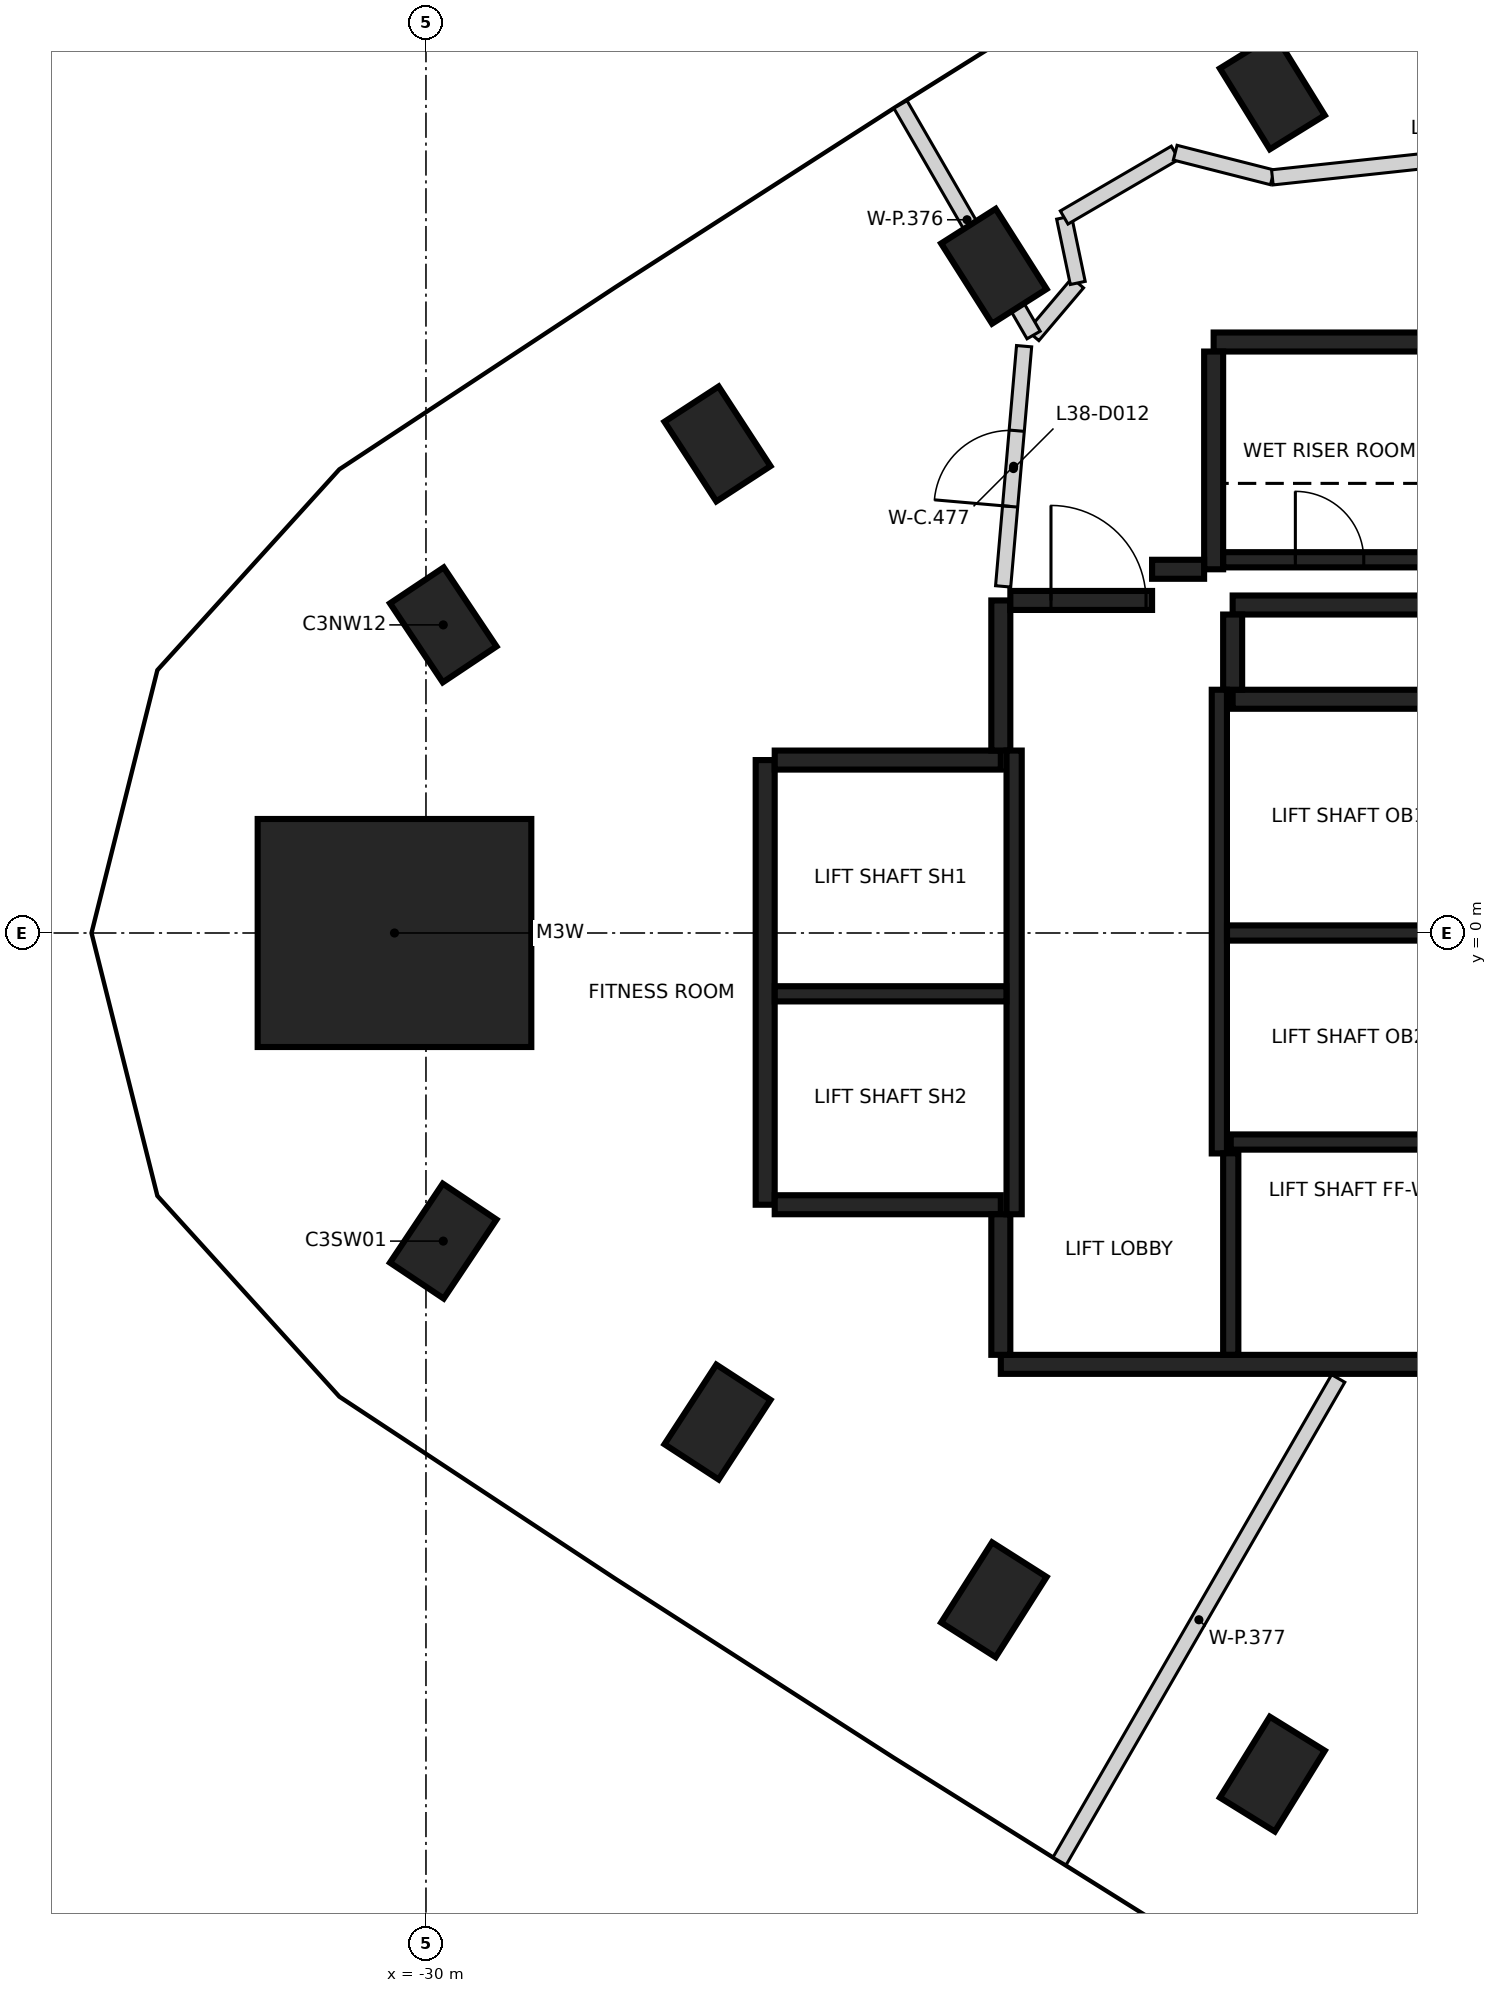
"""IFC4 building model, lengths in metres.
Left out: names, types, materials, properties, quantities, classifications, styles, units other than length and angle.
Written with IfcOpenShell. Run it as: python <this file> out.ifc"""

import sys

from ifc_helpers import new_model, si_unit, direction, frame, frame_2d, origin, origin_2d, place, context, subcontext, project, spatial, rectangle, extrude, element, fill, save


model = new_model("IFC4")
c1 = context("Model", 3, precision=1e-05, world=origin(), true_north=direction((0.0, 1.0)))
c2 = subcontext(c1, "Body", "Model", "MODEL_VIEW")
j1 = project(units=[si_unit("LENGTHUNIT", "METRE"), si_unit("PLANEANGLEUNIT", "RADIAN")], contexts=[c1])
p1 = place(None, origin())
s1 = spatial("IfcSite", under=j1, at=p1, CompositionType="ELEMENT")
p2 = place(p1, origin())
s2 = spatial("IfcBuilding", under=s1, at=p2, CompositionType="ELEMENT")
p3 = place(p2, frame((0.0, 0.0, 154.0)))
s3 = spatial("IfcBuildingStorey", under=s2, at=p3, CompositionType="ELEMENT", Elevation=154.0)
for number, where, z_axis, x_axis in (
    (1, (-18.865, 11.066, -0.4), (0.0, 0.0, 1.0), (-0.526, 0.851, 0.0)),
    (2, (-22.529, 8.772, -0.4), (0.0, 0.0, 1.0), (-0.536, 0.844, 0.0)),
    (3, (-26.165, 6.434, -0.4), (0.0, 0.0, 1.0), (-0.546, 0.838, 0.0)),
    (4, (-29.773, 4.053, -0.4), (0.0, 0.0, 1.0), (-0.556, 0.831, 0.0)),
    (5, (-29.773, -4.053, -0.4), (0.0, 0.0, 1.0), (0.556, 0.831, 0.0)),
    (6, (-26.165, -6.434, -0.4), (0.0, 0.0, 1.0), (0.546, 0.838, 0.0)),
    (7, (-22.529, -8.772, -0.4), (0.0, 0.0, 1.0), (0.536, 0.844, 0.0)),
    (8, (-18.865, -11.066, -0.4), (0.0, 0.0, 1.0), (0.526, 0.851, 0.0)),
):
    element("IfcColumn", number, at=place(p3, frame(where, z_axis=z_axis, x_axis=x_axis)), inside=s3, PredefinedType="COLUMN", context=c2, shape_type="SweptSolid", body=[
        extrude(rectangle(XDim=1.25, YDim=0.85, at=origin_2d()), origin(), (0.0, 0.0, 1.0), 3.6),
    ])
p4 = place(p3, frame((-30.414, 0.0, -0.4), z_axis=(0.0, 0.0, 1.0), x_axis=(1.0, 0.0, 0.0)))
e9 = element("IfcColumn", 9, at=p4, inside=s3, PredefinedType="COLUMN", context=c2, shape_type="SweptSolid", body=[
    extrude(rectangle(XDim=3.6, YDim=3.0, at=origin_2d()), origin(), (0.0, 0.0, 1.0), 3.6),
])
p5 = place(p3, frame((-16.187, -5.675, 0.0), z_axis=(0.0, 0.0, 1.0), x_axis=(-1.0, 0.0, 0.0)))
e10 = element("IfcWall", 10, at=p5, inside=s3, PredefinedType="SHEAR", context=c2, shape_type="SweptSolid", body=[
    extrude(rectangle(XDim=6.25, YDim=0.25, at=frame_2d((3.125, 0.0))), origin(), (0.0, 0.0, 1.0), 3.2),
])
p6 = place(p3, frame((-25.537, -3.575, 0.0), z_axis=(0.0, 0.0, 1.0), x_axis=(0.0, 1.0, 0.0)))
e11 = element("IfcWall", 11, at=p6, inside=s3, PredefinedType="SHEAR", context=c2, shape_type="SweptSolid", body=[
    extrude(rectangle(XDim=5.85, YDim=0.25, at=frame_2d((2.925, 0.0))), origin(), (0.0, 0.0, 1.0), 3.2),
])
p7 = place(p3, frame((-19.387, 3.075, 0.0), z_axis=(0.0, 0.0, 1.0), x_axis=(1.0, 0.0, 0.0)))
e12 = element("IfcWall", 12, at=p7, inside=s3, PredefinedType="SHEAR", context=c2, shape_type="SweptSolid", body=[
    extrude(rectangle(XDim=3.2, YDim=0.25, at=frame_2d((1.6, 0.0))), origin(), (0.0, 0.0, 1.0), 3.2),
])
for number, where, z_axis, x_axis in (
    (13, (-22.437, -3.575, 0.0), (0.0, 0.0, 1.0), (-1.0, 0.0, 0.0)),
    (14, (-25.412, 2.275, 0.0), (0.0, 0.0, 1.0), (1.0, 0.0, 0.0)),
):
    element("IfcWall", number, at=place(p3, frame(where, z_axis=z_axis, x_axis=x_axis)), inside=s3, PredefinedType="SHEAR", context=c2, shape_type="SweptSolid", body=[
        extrude(rectangle(XDim=2.975, YDim=0.25, at=frame_2d((1.487, 0.0))), origin(), (0.0, 0.0, 1.0), 3.2),
    ])
p8 = place(p3, frame((-19.637, 7.775, 0.0), z_axis=(0.0, 0.0, 1.0), x_axis=(1.0, 0.0, 0.0)))
e15 = element("IfcWall", 15, at=p8, inside=s3, PredefinedType="SHEAR", context=c2, shape_type="SweptSolid", body=[
    extrude(rectangle(XDim=3.05, YDim=0.25, at=frame_2d((1.525, 0.0))), origin(), (0.0, 0.0, 1.0), 3.2),
])
p9 = place(p3, frame((-19.637, 4.785, 0.0), z_axis=(0.0, 0.0, 1.0), x_axis=(0.0, 1.0, 0.0)))
e16 = element("IfcWall", 16, at=p9, inside=s3, PredefinedType="SHEAR", context=c2, shape_type="SweptSolid", body=[
    extrude(rectangle(XDim=2.865, YDim=0.25, at=frame_2d((1.432, 0.0))), origin(), (0.0, 0.0, 1.0), 3.2),
])
p10 = place(p3, frame((-16.302, 4.315, 0.0), z_axis=(0.0, 0.0, 1.0), x_axis=(-1.0, 0.0, 0.0)))
e17 = element("IfcWall", 17, at=p10, inside=s3, PredefinedType="SHEAR", context=c2, shape_type="SweptSolid", body=[
    extrude(rectangle(XDim=3.085, YDim=0.25, at=frame_2d((1.542, 0.0))), origin(), (0.0, 0.0, 1.0), 3.2),
])
p11 = place(p3, frame((-22.437, 2.4, 0.0), z_axis=(0.0, 0.0, 1.0), x_axis=(0.0, 1.0, 0.0)))
e18 = element("IfcWall", 18, at=p11, inside=s3, PredefinedType="SHEAR", context=c2, shape_type="SweptSolid", body=[
    extrude(rectangle(XDim=1.975, YDim=0.25, at=frame_2d((0.987, 0.0))), origin(), (0.0, 0.0, 1.0), 3.2),
])
p12 = place(p3, frame((-22.437, -5.55, 0.0), z_axis=(0.0, 0.0, 1.0), x_axis=(0.0, 1.0, 0.0)))
e19 = element("IfcWall", 19, at=p12, inside=s3, PredefinedType="SHEAR", context=c2, shape_type="SweptSolid", body=[
    extrude(rectangle(XDim=1.849, YDim=0.25, at=frame_2d((0.925, 0.0))), origin(), (0.0, 0.0, 1.0), 3.2),
])
p13 = place(p3, frame((-22.312, 4.375, 0.0), z_axis=(0.0, 0.0, 1.0), x_axis=(1.0, 0.0, 0.0)))
e20 = element("IfcWall", 20, at=p13, inside=s3, PredefinedType="SHEAR", context=c2, shape_type="SweptSolid", body=[
    extrude(rectangle(XDim=1.865, YDim=0.25, at=frame_2d((0.932, 0.0))), origin(), (0.0, 0.0, 1.0), 3.2),
])
p14 = place(p13, frame((0.535, 0.0, 0.0)))
e21 = element("IfcOpeningElement", 21, at=p14, cuts=e20, PredefinedType="OPENING", context=c2, shape_type="SweptSolid", body=[
    extrude(rectangle(XDim=1.25, YDim=2.1, at=frame_2d((0.625, 1.05))), frame((0.0, 0.135, 0.0), z_axis=(0.0, -1.0, 0.0), x_axis=(1.0, 0.0, 0.0)), (0.0, 0.0, 1.0), 0.27),
])
p15 = place(p3, frame((-19.387, 4.19, 0.0), z_axis=(0.0, 0.0, 1.0), x_axis=(0.0, -1.0, 0.0)))
e22 = element("IfcWall", 22, at=p15, inside=s3, PredefinedType="SHEAR", context=c2, shape_type="SweptSolid", body=[
    extrude(rectangle(XDim=0.989, YDim=0.25, at=frame_2d((0.495, 0.0))), origin(), (0.0, 0.0, 1.0), 3.2),
])
p16 = place(p3, frame((-20.447, 4.785, 0.0), z_axis=(0.0, 0.0, 1.0), x_axis=(1.0, 0.0, 0.0)))
e23 = element("IfcWall", 23, at=p16, inside=s3, PredefinedType="SHEAR", context=c2, shape_type="SweptSolid", body=[
    extrude(rectangle(XDim=0.685, YDim=0.25, at=frame_2d((0.342, 0.0))), origin(), (0.0, 0.0, 1.0), 3.2),
])
for number, where, z_axis, x_axis in (
    (24, (-19.562, -2.9, 0.0), (0.0, 0.0, 1.0), (0.0, 1.0, 0.0)),
    (25, (-22.262, 2.4, 0.0), (0.0, 0.0, 1.0), (0.0, -1.0, 0.0)),
):
    element("IfcWall", number, at=place(p3, frame(where, z_axis=z_axis, x_axis=x_axis)), inside=s3, PredefinedType="SHEAR", context=c2, shape_type="SweptSolid", body=[
        extrude(rectangle(XDim=6.1, YDim=0.2, at=frame_2d((3.05, 0.0))), origin(), (0.0, 0.0, 1.0), 3.2),
    ])
p17 = place(p3, frame((-16.263, 0.0, 0.0), z_axis=(0.0, 0.0, 1.0), x_axis=(-1.0, 0.0, 0.0)))
e26 = element("IfcWall", 26, at=p17, inside=s3, PredefinedType="SHEAR", context=c2, shape_type="SweptSolid", body=[
    extrude(rectangle(XDim=3.198, YDim=0.2, at=frame_2d((1.599, 0.0))), origin(), (0.0, 0.0, 1.0), 3.2),
])
p18 = place(p3, frame((-22.363, -0.8, 0.0), z_axis=(0.0, 0.0, 1.0), x_axis=(-1.0, 0.0, 0.0)))
e27 = element("IfcWall", 27, at=p18, inside=s3, PredefinedType="SHEAR", context=c2, shape_type="SweptSolid", body=[
    extrude(rectangle(XDim=3.048, YDim=0.2, at=frame_2d((1.524, 0.0))), origin(), (0.0, 0.0, 1.0), 3.2),
])
p19 = place(p3, frame((-19.511, 4.91, 0.0), z_axis=(0.0, 0.0, 1.0), x_axis=(1.0, 0.0, 0.0)))
e28 = element("IfcWall", 28, at=p19, inside=s3, PredefinedType="SHEAR", context=c2, shape_type="SweptSolid", body=[
    extrude(rectangle(XDim=2.798, YDim=0.2, at=frame_2d((1.399, 0.0))), origin(), (0.0, 0.0, 1.0), 3.2),
])
p20 = place(p19, frame((0.949, 0.0, 0.0)))
e29 = element("IfcOpeningElement", 29, at=p20, cuts=e28, PredefinedType="OPENING", context=c2, shape_type="SweptSolid", body=[
    extrude(rectangle(XDim=0.9, YDim=2.1, at=frame_2d((0.45, 1.05))), frame((0.0, 0.11, 0.0), z_axis=(0.0, -1.0, 0.0), x_axis=(1.0, 0.0, 0.0)), (0.0, 0.0, 1.0), 0.22),
])
p21 = place(p3, frame((-19.412, -2.75, 0.0), z_axis=(0.0, 0.0, 1.0), x_axis=(1.0, 0.0, 0.0)))
e30 = element("IfcWall", 30, at=p21, inside=s3, PredefinedType="SHEAR", context=c2, shape_type="SweptSolid", body=[
    extrude(rectangle(XDim=3.1, YDim=0.2, at=frame_2d((1.55, 0.0))), origin(), (0.0, 0.0, 1.0), 3.2),
])
p22 = place(p3, frame((-19.412, -5.549, 0.0), z_axis=(0.0, 0.0, 1.0), x_axis=(0.0, 1.0, 0.0)))
e31 = element("IfcWall", 31, at=p22, inside=s3, PredefinedType="SHEAR", context=c2, shape_type="SweptSolid", body=[
    extrude(rectangle(XDim=2.651, YDim=0.2, at=frame_2d((1.325, 0.0))), origin(), (0.0, 0.0, 1.0), 3.2),
])
p23 = place(p3, frame((-22.407, 4.56, 0.0), z_axis=(0.0, 0.0, 1.0), x_axis=(0.086898645684, 0.996217157741, 0.0)))
e32 = element("IfcWall", 32, at=p23, inside=s3, PredefinedType="PARTITIONING", context=c2, shape_type="SweptSolid", body=[
    extrude(rectangle(XDim=3.172, YDim=0.2, at=frame_2d((1.586, 0.0))), origin(), (0.0, 0.0, 1.0), 3.2),
])
p24 = place(p23, frame((1.056, 0.0, 0.0)))
e33 = element("IfcOpeningElement", 33, at=p24, cuts=e32, PredefinedType="OPENING", context=c2, shape_type="SweptSolid", body=[
    extrude(rectangle(XDim=1.0, YDim=2.1, at=frame_2d((0.5, 1.05))), frame((0.0, 0.11, 0.0), z_axis=(0.0, -1.0, 0.0), x_axis=(1.0, 0.0, 0.0)), (0.0, 0.0, 1.0), 0.22),
])
p25 = place(p3, frame((-22.013, 7.858, 0.0), z_axis=(0.0, 0.0, 1.0), x_axis=(0.646315152402, 0.763070588986, 0.0)))
e34 = element("IfcWall", 34, at=p25, inside=s3, PredefinedType="PARTITIONING", context=c2, shape_type="SweptSolid", body=[
    extrude(rectangle(XDim=0.91, YDim=0.2, at=frame_2d((0.455, 0.0))), origin(), (0.0, 0.0, 1.0), 3.2),
])
p26 = place(p3, frame((-21.605, 9.412, 0.0), z_axis=(0.0, 0.0, 1.0), x_axis=(0.204764111512, -0.978811349871, 0.0)))
e35 = element("IfcWall", 35, at=p26, inside=s3, PredefinedType="PARTITIONING", context=c2, shape_type="SweptSolid", body=[
    extrude(rectangle(XDim=0.879, YDim=0.2, at=frame_2d((0.439, 0.0))), origin(), (0.0, 0.0, 1.0), 2.3),
])
p27 = place(p3, frame((-21.604, 9.413, 0.0), z_axis=(0.0, 0.0, 1.0), x_axis=(0.863736988548, 0.503942868402, 0.0)))
e36 = element("IfcWall", 36, at=p27, inside=s3, PredefinedType="PARTITIONING", context=c2, shape_type="SweptSolid", body=[
    extrude(rectangle(XDim=1.69, YDim=0.2, at=frame_2d((0.845, 0.0))), origin(), (0.0, 0.0, 1.0), 2.3),
])
p28 = place(p3, frame((-20.143, 10.266, 0.0), z_axis=(0.0, 0.0, 1.0), x_axis=(0.969121308325, -0.246584447505, 0.0)))
e37 = element("IfcWall", 37, at=p28, inside=s3, PredefinedType="PARTITIONING", context=c2, shape_type="SweptSolid", body=[
    extrude(rectangle(XDim=1.319, YDim=0.2, at=frame_2d((0.659, 0.0))), origin(), (0.0, 0.0, 1.0), 2.3),
])
p29 = place(p3, frame((-18.865, 9.941, 0.0), z_axis=(0.0, 0.0, 1.0), x_axis=(0.99423123086, 0.107257911519, 0.0)))
e38 = element("IfcWall", 38, at=p29, inside=s3, PredefinedType="PARTITIONING", context=c2, shape_type="SweptSolid", body=[
    extrude(rectangle(XDim=2.854, YDim=0.2, at=frame_2d((1.427, 0.0))), origin(), (0.0, 0.0, 1.0), 3.2),
])
p30 = place(p3, frame((-23.758, 10.9, 0.0), z_axis=(0.0, 0.0, 1.0), x_axis=(0.500112665219, -0.865960346718, 0.0)))
e39 = element("IfcWall", 39, at=p30, inside=s3, PredefinedType="PARTITIONING", context=c2, shape_type="SweptSolid", body=[
    extrude(rectangle(XDim=3.502, YDim=0.2, at=frame_2d((1.751, 0.0))), origin(), (0.0, 0.0, 1.0), 3.2),
])
p31 = place(p3, frame((-21.664, -12.21, 0.0), z_axis=(0.0, 0.0, 1.0), x_axis=(0.499938621367, 0.866060837855, 0.0)))
e40 = element("IfcWall", 40, at=p31, inside=s3, PredefinedType="PARTITIONING", context=c2, shape_type="SweptSolid", body=[
    extrude(rectangle(XDim=7.333, YDim=0.2, at=frame_2d((3.666, 0.0))), origin(), (0.0, 0.0, 1.0), 2.3),
])
p32 = place(p14, origin())
e41 = element("IfcDoor", 41, at=p32, inside=s3, OperationType="SINGLE_SWING_LEFT", PredefinedType="DOOR", context=c2, shape_type="SweptSolid", body=[
    extrude(rectangle(XDim=1.25, YDim=2.1, at=frame_2d((0.625, 1.05))), frame((0.0, 0.025, 0.0), z_axis=(0.0, -1.0, 0.0), x_axis=(1.0, 0.0, 0.0)), (0.0, 0.0, 1.0), 0.05),
])
fill(e21, e41)
p33 = place(p20, origin())
e42 = element("IfcDoor", 42, at=p33, inside=s3, OperationType="SINGLE_SWING_LEFT", PredefinedType="DOOR", context=c2, shape_type="SweptSolid", body=[
    extrude(rectangle(XDim=0.9, YDim=2.1, at=frame_2d((0.45, 1.05))), frame((0.0, 0.025, 0.0), z_axis=(0.0, -1.0, 0.0), x_axis=(1.0, 0.0, 0.0)), (0.0, 0.0, 1.0), 0.05),
])
fill(e29, e42)
p34 = place(p24, origin())
e43 = element("IfcDoor", 43, at=p34, inside=s3, OperationType="SINGLE_SWING_LEFT", PredefinedType="DOOR", context=c2, shape_type="SweptSolid", body=[
    extrude(rectangle(XDim=1.0, YDim=2.1, at=frame_2d((0.5, 1.05))), frame((0.0, 0.025, 0.0), z_axis=(0.0, -1.0, 0.0), x_axis=(1.0, 0.0, 0.0)), (0.0, 0.0, 1.0), 0.05),
])
fill(e33, e43)
save(model, sys.argv[1])
